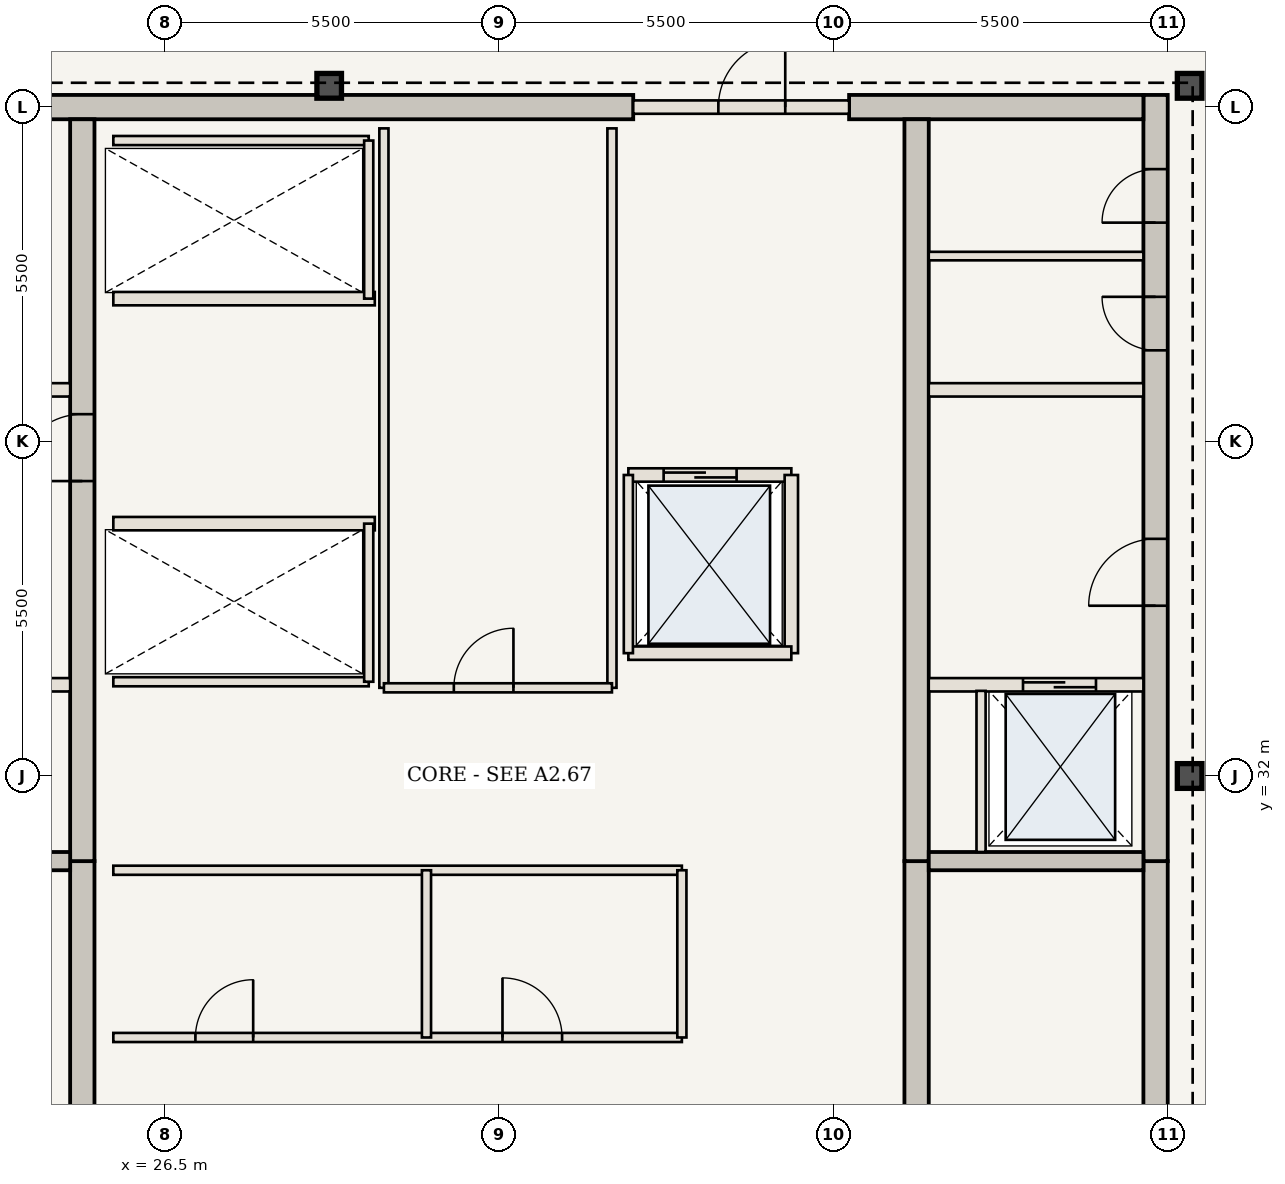
"""IFC4 building model, lengths in metres.
Left out: names, types, materials, properties, quantities, classifications, styles, units other than length and angle.
Written with IfcOpenShell. Run it as: python <this file> out.ifc"""

import sys

from ifc_helpers import new_model, si_unit, direction, frame, frame_2d, origin, origin_2d, place, context, subcontext, project, spatial, rectangle, i_section, extrude, element, fill, save


model = new_model("IFC4")
c1 = context("Model", 3, precision=1e-05, world=origin(), true_north=direction((0.0, 1.0)))
c2 = subcontext(c1, "Body", "Model", "MODEL_VIEW")
j1 = project(units=[si_unit("LENGTHUNIT", "METRE"), si_unit("PLANEANGLEUNIT", "RADIAN")], contexts=[c1])
p1 = place(None, origin())
s1 = spatial("IfcSite", under=j1, at=p1, CompositionType="ELEMENT")
p2 = place(p1, origin())
s2 = spatial("IfcBuilding", under=s1, at=p2, CompositionType="ELEMENT")
p3 = place(p2, frame((0.0, 0.0, 313.25)))
s3 = spatial("IfcBuildingStorey", under=s2, at=p3, CompositionType="ELEMENT", Elevation=313.25)
p4 = place(p3, frame((42.79, 20.75, 0.0), z_axis=(0.0, 0.0, 1.0), x_axis=(0.0, 1.0, 0.0)))
e1 = element("IfcWall", 1, at=p4, inside=s3, PredefinedType="SHEAR", context=c2, shape_type="SweptSolid", body=[
    extrude(rectangle(XDim=9.85, YDim=0.4, at=frame_2d((4.925, 0.0))), origin(), (0.0, 0.0, 1.0), 4.55),
])
p5 = place(p4, frame((1.0, 0.0, 0.0)))
e2 = element("IfcOpeningElement", 2, at=p5, cuts=e1, PredefinedType="OPENING", context=c2, shape_type="SweptSolid", body=[
    extrude(rectangle(XDim=1.15, YDim=2.15, at=frame_2d((0.575, 1.075))), frame((0.0, 0.21, 0.0), z_axis=(0.0, -1.0, 0.0), x_axis=(1.0, 0.0, 0.0)), (0.0, 0.0, 1.0), 0.42),
])
p6 = place(p3, frame((42.79, 30.6, 0.0), z_axis=(0.0, 0.0, 1.0), x_axis=(0.0, 1.0, 0.0)))
e3 = element("IfcWall", 3, at=p6, inside=s3, PredefinedType="SHEAR", context=c2, shape_type="SweptSolid", body=[
    extrude(rectangle(XDim=12.6, YDim=0.4, at=frame_2d((6.3, 0.0))), origin(), (0.0, 0.0, 1.0), 4.55),
])
p7 = place(p6, frame((4.2, 0.0, 0.0)))
e4 = element("IfcOpeningElement", 4, at=p7, cuts=e3, PredefinedType="OPENING", context=c2, shape_type="SweptSolid", body=[
    extrude(rectangle(XDim=1.1, YDim=2.15, at=frame_2d((0.55, 1.075))), frame((0.0, 0.21, 0.0), z_axis=(0.0, -1.0, 0.0), x_axis=(1.0, 0.0, 0.0)), (0.0, 0.0, 1.0), 0.42),
])
p8 = place(p6, frame((8.4, 0.0, 0.0)))
e5 = element("IfcOpeningElement", 5, at=p8, cuts=e3, PredefinedType="OPENING", context=c2, shape_type="SweptSolid", body=[
    extrude(rectangle(XDim=0.88, YDim=2.1, at=frame_2d((0.44, 1.05))), frame((0.0, 0.21, 0.0), z_axis=(0.0, -1.0, 0.0), x_axis=(1.0, 0.0, 0.0)), (0.0, 0.0, 1.0), 0.42),
])
p9 = place(p6, frame((10.5, 0.0, 0.0)))
e6 = element("IfcOpeningElement", 6, at=p9, cuts=e3, PredefinedType="OPENING", context=c2, shape_type="SweptSolid", body=[
    extrude(rectangle(XDim=0.88, YDim=2.1, at=frame_2d((0.44, 1.05))), frame((0.0, 0.21, 0.0), z_axis=(0.0, -1.0, 0.0), x_axis=(1.0, 0.0, 0.0)), (0.0, 0.0, 1.0), 0.42),
])
p10 = place(p3, frame((21.41, 43.0, 0.0), z_axis=(0.0, 0.0, 1.0), x_axis=(1.0, 0.0, 0.0)))
e7 = element("IfcWall", 7, at=p10, inside=s3, PredefinedType="SHEAR", context=c2, shape_type="SweptSolid", body=[
    extrude(rectangle(XDim=12.79, YDim=0.4, at=frame_2d((6.395, 0.0))), origin(), (0.0, 0.0, 1.0), 4.55),
])
p11 = place(p3, frame((37.75, 43.0, 0.0), z_axis=(0.0, 0.0, 1.0), x_axis=(1.0, 0.0, 0.0)))
e8 = element("IfcWall", 8, at=p11, inside=s3, PredefinedType="SHEAR", context=c2, shape_type="SweptSolid", body=[
    extrude(rectangle(XDim=4.84, YDim=0.4, at=frame_2d((2.42, 0.0))), origin(), (0.0, 0.0, 1.0), 4.55),
])
p12 = place(p3, frame((25.14, 21.15, 0.0), z_axis=(0.0, 0.0, 1.0), x_axis=(0.0, 1.0, 0.0)))
e9 = element("IfcWall", 9, at=p12, inside=s3, PredefinedType="SHEAR", context=c2, shape_type="SweptSolid", body=[
    extrude(rectangle(XDim=9.45, YDim=0.4, at=frame_2d((4.725, 0.0))), origin(), (0.0, 0.0, 1.0), 4.55),
])
p13 = place(p3, frame((25.14, 30.6, 0.0), z_axis=(0.0, 0.0, 1.0), x_axis=(0.0, 1.0, 0.0)))
e10 = element("IfcWall", 10, at=p13, inside=s3, PredefinedType="SHEAR", context=c2, shape_type="SweptSolid", body=[
    extrude(rectangle(XDim=12.2, YDim=0.4, at=frame_2d((6.1, 0.0))), origin(), (0.0, 0.0, 1.0), 4.55),
])
p14 = place(p13, frame((6.25, 0.0, 0.0)))
e11 = element("IfcOpeningElement", 11, at=p14, cuts=e10, PredefinedType="OPENING", context=c2, shape_type="SweptSolid", body=[
    extrude(rectangle(XDim=1.1, YDim=2.15, at=frame_2d((0.55, 1.075))), frame((0.0, 0.21, 0.0), z_axis=(0.0, -1.0, 0.0), x_axis=(1.0, 0.0, 0.0)), (0.0, 0.0, 1.0), 0.42),
])
p15 = place(p3, frame((38.86, 21.15, 0.0), z_axis=(0.0, 0.0, 1.0), x_axis=(0.0, 1.0, 0.0)))
e12 = element("IfcWall", 12, at=p15, inside=s3, PredefinedType="SHEAR", context=c2, shape_type="SweptSolid", body=[
    extrude(rectangle(XDim=9.45, YDim=0.4, at=frame_2d((4.725, 0.0))), origin(), (0.0, 0.0, 1.0), 4.55),
])
p16 = place(p3, frame((38.86, 30.6, 0.0), z_axis=(0.0, 0.0, 1.0), x_axis=(0.0, 1.0, 0.0)))
e13 = element("IfcWall", 13, at=p16, inside=s3, PredefinedType="SHEAR", context=c2, shape_type="SweptSolid", body=[
    extrude(rectangle(XDim=12.2, YDim=0.4, at=frame_2d((6.1, 0.0))), origin(), (0.0, 0.0, 1.0), 4.55),
])
for number, where, z_axis, x_axis in (
    (14, (43.35, 32.0, 0.0), (0.0, 0.0, 1.0), (1.0, 0.0, 0.0)),
    (15, (43.35, 43.35, 0.0), (0.0, 0.0, 1.0), (1.0, 0.0, 0.0)),
    (16, (29.2, 43.35, 0.0), (0.0, 0.0, 1.0), (1.0, 0.0, 0.0)),
):
    element("IfcColumn", number, at=place(p3, frame(where, z_axis=z_axis, x_axis=x_axis)), inside=s3, PredefinedType="COLUMN", context=c2, shape_type="SweptSolid", body=[
        extrude(i_section(OverallWidth=0.404, OverallDepth=0.407, WebThickness=0.027, FlangeThickness=0.044, at=origin_2d()), origin(), (0.0, 0.0, 1.0), 4.55),
    ])
for number, where, z_axis, x_axis in (
    (17, (21.41, 30.6, 0.0), (0.0, 0.0, 1.0), (1.0, 0.0, 0.0)),
    (18, (39.06, 30.6, 0.0), (0.0, 0.0, 1.0), (1.0, 0.0, 0.0)),
):
    element("IfcWall", number, at=place(p3, frame(where, z_axis=z_axis, x_axis=x_axis)), inside=s3, PredefinedType="SHEAR", context=c2, shape_type="SweptSolid", body=[
        extrude(rectangle(XDim=3.53, YDim=0.3, at=frame_2d((1.765, 0.0))), origin(), (0.0, 0.0, 1.0), 4.29),
    ])
p17 = place(p3, frame((21.41, 33.5, 0.0), z_axis=(0.0, 0.0, 1.0), x_axis=(1.0, 0.0, 0.0)))
e19 = element("IfcWall", 19, at=p17, inside=s3, PredefinedType="STANDARD", context=c2, shape_type="SweptSolid", body=[
    extrude(rectangle(XDim=3.53, YDim=0.22, at=frame_2d((1.765, 0.0))), origin(), (0.0, 0.0, 1.0), 4.29),
])
p18 = place(p17, frame((0.75, 0.0, 0.0)))
e20 = element("IfcOpeningElement", 20, at=p18, cuts=e19, PredefinedType="OPENING", context=c2, shape_type="SweptSolid", body=[
    extrude(rectangle(XDim=1.2, YDim=2.2, at=frame_2d((0.6, 1.1))), frame((0.0, 0.12, 0.0), z_axis=(0.0, -1.0, 0.0), x_axis=(1.0, 0.0, 0.0)), (0.0, 0.0, 1.0), 0.24),
])
p19 = place(p3, frame((39.06, 33.5, 0.0), z_axis=(0.0, 0.0, 1.0), x_axis=(1.0, 0.0, 0.0)))
e21 = element("IfcWall", 21, at=p19, inside=s3, PredefinedType="STANDARD", context=c2, shape_type="SweptSolid", body=[
    extrude(rectangle(XDim=3.53, YDim=0.22, at=frame_2d((1.765, 0.0))), origin(), (0.0, 0.0, 1.0), 4.29),
])
p20 = place(p19, frame((1.55, 0.0, 0.0)))
e22 = element("IfcOpeningElement", 22, at=p20, cuts=e21, PredefinedType="OPENING", context=c2, shape_type="SweptSolid", body=[
    extrude(rectangle(XDim=1.2, YDim=2.2, at=frame_2d((0.6, 1.1))), frame((0.0, 0.12, 0.0), z_axis=(0.0, -1.0, 0.0), x_axis=(1.0, 0.0, 0.0)), (0.0, 0.0, 1.0), 0.24),
])
p21 = place(p3, frame((39.92, 30.75, 0.0), z_axis=(0.0, 0.0, 1.0), x_axis=(0.0, 1.0, 0.0)))
e23 = element("IfcWall", 23, at=p21, inside=s3, PredefinedType="STANDARD", context=c2, shape_type="SweptSolid", body=[
    extrude(rectangle(XDim=2.65, YDim=0.15, at=frame_2d((1.325, 0.0))), origin(), (0.0, 0.0, 1.0), 4.29),
])
for number, where, z_axis, x_axis in (
    (24, (21.41, 38.35, 0.0), (0.0, 0.0, 1.0), (1.0, 0.0, 0.0)),
    (25, (39.06, 38.35, 0.0), (0.0, 0.0, 1.0), (1.0, 0.0, 0.0)),
):
    element("IfcWall", number, at=place(p3, frame(where, z_axis=z_axis, x_axis=x_axis)), inside=s3, PredefinedType="STANDARD", context=c2, shape_type="SweptSolid", body=[
        extrude(rectangle(XDim=3.53, YDim=0.22, at=frame_2d((1.765, 0.0))), origin(), (0.0, 0.0, 1.0), 4.29),
    ])
p22 = place(p3, frame((39.06, 40.55, 0.0), z_axis=(0.0, 0.0, 1.0), x_axis=(1.0, 0.0, 0.0)))
e26 = element("IfcWall", 26, at=p22, inside=s3, PredefinedType="STANDARD", context=c2, shape_type="SweptSolid", body=[
    extrude(rectangle(XDim=3.53, YDim=0.14, at=frame_2d((1.765, 0.0))), origin(), (0.0, 0.0, 1.0), 4.29),
])
p23 = place(p3, frame((25.65, 27.7, 0.0), z_axis=(0.0, 0.0, 1.0), x_axis=(1.0, 0.0, 0.0)))
e27 = element("IfcWall", 27, at=p23, inside=s3, PredefinedType="STANDARD", context=c2, shape_type="SweptSolid", body=[
    extrude(rectangle(XDim=9.35, YDim=0.15, at=frame_2d((4.675, 0.0))), origin(), (0.0, 0.0, 1.0), 4.29),
])
p24 = place(p23, frame((1.35, 0.0, 0.0)))
e28 = element("IfcOpeningElement", 28, at=p24, cuts=e27, PredefinedType="OPENING", context=c2, shape_type="SweptSolid", body=[
    extrude(rectangle(XDim=0.95, YDim=2.15, at=frame_2d((0.475, 1.075))), frame((0.0, 0.085, 0.0), z_axis=(0.0, -1.0, 0.0), x_axis=(1.0, 0.0, 0.0)), (0.0, 0.0, 1.0), 0.17),
])
p25 = place(p23, frame((6.4, 0.0, 0.0)))
e29 = element("IfcOpeningElement", 29, at=p25, cuts=e27, PredefinedType="OPENING", context=c2, shape_type="SweptSolid", body=[
    extrude(rectangle(XDim=0.98, YDim=2.2, at=frame_2d((0.49, 1.1))), frame((0.0, 0.085, 0.0), z_axis=(0.0, -1.0, 0.0), x_axis=(1.0, 0.0, 0.0)), (0.0, 0.0, 1.0), 0.17),
])
p26 = place(p3, frame((25.65, 30.45, 0.0), z_axis=(0.0, 0.0, 1.0), x_axis=(1.0, 0.0, 0.0)))
e30 = element("IfcWall", 30, at=p26, inside=s3, PredefinedType="STANDARD", context=c2, shape_type="SweptSolid", body=[
    extrude(rectangle(XDim=9.35, YDim=0.15, at=frame_2d((4.675, 0.0))), origin(), (0.0, 0.0, 1.0), 4.29),
])
for number, where, z_axis, x_axis in (
    (31, (30.8, 27.7, 0.0), (0.0, 0.0, 1.0), (0.0, 1.0, 0.0)),
    (32, (35.0, 27.7, 0.0), (0.0, 0.0, 1.0), (0.0, 1.0, 0.0)),
):
    element("IfcWall", number, at=place(p3, frame(where, z_axis=z_axis, x_axis=x_axis)), inside=s3, PredefinedType="STANDARD", context=c2, shape_type="SweptSolid", body=[
        extrude(rectangle(XDim=2.75, YDim=0.15, at=frame_2d((1.375, 0.0))), origin(), (0.0, 0.0, 1.0), 4.29),
    ])
p27 = place(p3, frame((25.65, 36.15, 0.0), z_axis=(0.0, 0.0, 1.0), x_axis=(1.0, 0.0, 0.0)))
e33 = element("IfcWall", 33, at=p27, inside=s3, PredefinedType="STANDARD", context=c2, shape_type="SweptSolid", body=[
    extrude(rectangle(XDim=4.3, YDim=0.22, at=frame_2d((2.15, 0.0))), origin(), (0.0, 0.0, 1.0), 4.29),
])
p28 = place(p3, frame((25.65, 33.55, 0.0), z_axis=(0.0, 0.0, 1.0), x_axis=(1.0, 0.0, 0.0)))
e34 = element("IfcWall", 34, at=p28, inside=s3, PredefinedType="STANDARD", context=c2, shape_type="SweptSolid", body=[
    extrude(rectangle(XDim=4.2, YDim=0.15, at=frame_2d((2.1, 0.0))), origin(), (0.0, 0.0, 1.0), 4.29),
])
p29 = place(p3, frame((29.85, 33.55, 0.0), z_axis=(0.0, 0.0, 1.0), x_axis=(0.0, 1.0, 0.0)))
e35 = element("IfcWall", 35, at=p29, inside=s3, PredefinedType="STANDARD", context=c2, shape_type="SweptSolid", body=[
    extrude(rectangle(XDim=2.6, YDim=0.15, at=frame_2d((1.3, 0.0))), origin(), (0.0, 0.0, 1.0), 4.29),
])
p30 = place(p3, frame((25.65, 39.85, 0.0), z_axis=(0.0, 0.0, 1.0), x_axis=(1.0, 0.0, 0.0)))
e36 = element("IfcWall", 36, at=p30, inside=s3, PredefinedType="STANDARD", context=c2, shape_type="SweptSolid", body=[
    extrude(rectangle(XDim=4.3, YDim=0.22, at=frame_2d((2.15, 0.0))), origin(), (0.0, 0.0, 1.0), 4.29),
])
p31 = place(p3, frame((25.65, 42.45, 0.0), z_axis=(0.0, 0.0, 1.0), x_axis=(1.0, 0.0, 0.0)))
e37 = element("IfcWall", 37, at=p31, inside=s3, PredefinedType="STANDARD", context=c2, shape_type="SweptSolid", body=[
    extrude(rectangle(XDim=4.2, YDim=0.15, at=frame_2d((2.1, 0.0))), origin(), (0.0, 0.0, 1.0), 4.29),
])
p32 = place(p3, frame((29.85, 39.85, 0.0), z_axis=(0.0, 0.0, 1.0), x_axis=(0.0, 1.0, 0.0)))
e38 = element("IfcWall", 38, at=p32, inside=s3, PredefinedType="STANDARD", context=c2, shape_type="SweptSolid", body=[
    extrude(rectangle(XDim=2.6, YDim=0.15, at=frame_2d((1.3, 0.0))), origin(), (0.0, 0.0, 1.0), 4.29),
])
for number, where, z_axis, x_axis in (
    (39, (30.1, 33.45, 0.0), (0.0, 0.0, 1.0), (0.0, 1.0, 0.0)),
    (40, (33.85, 33.45, 0.0), (0.0, 0.0, 1.0), (0.0, 1.0, 0.0)),
):
    element("IfcWall", number, at=place(p3, frame(where, z_axis=z_axis, x_axis=x_axis)), inside=s3, PredefinedType="STANDARD", context=c2, shape_type="SweptSolid", body=[
        extrude(rectangle(XDim=9.2, YDim=0.15, at=frame_2d((4.6, 0.0))), origin(), (0.0, 0.0, 1.0), 4.29),
    ])
p33 = place(p3, frame((30.1, 33.45, 0.0), z_axis=(0.0, 0.0, 1.0), x_axis=(1.0, 0.0, 0.0)))
e41 = element("IfcWall", 41, at=p33, inside=s3, PredefinedType="STANDARD", context=c2, shape_type="SweptSolid", body=[
    extrude(rectangle(XDim=3.75, YDim=0.15, at=frame_2d((1.875, 0.0))), origin(), (0.0, 0.0, 1.0), 4.29),
])
p34 = place(p33, frame((1.15, 0.0, 0.0)))
e42 = element("IfcOpeningElement", 42, at=p34, cuts=e41, PredefinedType="OPENING", context=c2, shape_type="SweptSolid", body=[
    extrude(rectangle(XDim=0.98, YDim=2.2, at=frame_2d((0.49, 1.1))), frame((0.0, 0.085, 0.0), z_axis=(0.0, -1.0, 0.0), x_axis=(1.0, 0.0, 0.0)), (0.0, 0.0, 1.0), 0.17),
])
p35 = place(p3, frame((34.2, 43.0, 0.0), z_axis=(0.0, 0.0, 1.0), x_axis=(1.0, 0.0, 0.0)))
e43 = element("IfcWall", 43, at=p35, inside=s3, PredefinedType="STANDARD", context=c2, shape_type="SweptSolid", body=[
    extrude(rectangle(XDim=3.55, YDim=0.22, at=frame_2d((1.775, 0.0))), origin(), (0.0, 0.0, 1.0), 4.29),
])
p36 = place(p35, frame((1.4, 0.0, 0.0)))
e44 = element("IfcOpeningElement", 44, at=p36, cuts=e43, PredefinedType="OPENING", context=c2, shape_type="SweptSolid", body=[
    extrude(rectangle(XDim=1.1, YDim=2.15, at=frame_2d((0.55, 1.075))), frame((0.0, 0.12, 0.0), z_axis=(0.0, -1.0, 0.0), x_axis=(1.0, 0.0, 0.0)), (0.0, 0.0, 1.0), 0.24),
])
p37 = place(p3, frame((34.12, 36.95, 0.0), z_axis=(0.0, 0.0, 1.0), x_axis=(1.0, 0.0, 0.0)))
e45 = element("IfcWall", 45, at=p37, inside=s3, PredefinedType="STANDARD", context=c2, shape_type="SweptSolid", body=[
    extrude(rectangle(XDim=2.68, YDim=0.22, at=frame_2d((1.34, 0.0))), origin(), (0.0, 0.0, 1.0), 4.29),
])
p38 = place(p37, frame((0.58, 0.0, 0.0)))
e46 = element("IfcOpeningElement", 46, at=p38, cuts=e45, PredefinedType="OPENING", context=c2, shape_type="SweptSolid", body=[
    extrude(rectangle(XDim=1.2, YDim=2.2, at=frame_2d((0.6, 1.1))), frame((0.0, 0.12, 0.0), z_axis=(0.0, -1.0, 0.0), x_axis=(1.0, 0.0, 0.0)), (0.0, 0.0, 1.0), 0.24),
])
p39 = place(p3, frame((36.8, 34.02, 0.0), z_axis=(0.0, 0.0, 1.0), x_axis=(0.0, 1.0, 0.0)))
e47 = element("IfcWall", 47, at=p39, inside=s3, PredefinedType="STANDARD", context=c2, shape_type="SweptSolid", body=[
    extrude(rectangle(XDim=2.93, YDim=0.22, at=frame_2d((1.465, 0.0))), origin(), (0.0, 0.0, 1.0), 4.29),
])
p40 = place(p3, frame((34.12, 34.02, 0.0), z_axis=(0.0, 0.0, 1.0), x_axis=(1.0, 0.0, 0.0)))
e48 = element("IfcWall", 48, at=p40, inside=s3, PredefinedType="STANDARD", context=c2, shape_type="SweptSolid", body=[
    extrude(rectangle(XDim=2.68, YDim=0.22, at=frame_2d((1.34, 0.0))), origin(), (0.0, 0.0, 1.0), 4.29),
])
p41 = place(p3, frame((34.12, 34.02, 0.0), z_axis=(0.0, 0.0, 1.0), x_axis=(0.0, 1.0, 0.0)))
e49 = element("IfcWall", 49, at=p41, inside=s3, PredefinedType="STANDARD", context=c2, shape_type="SweptSolid", body=[
    extrude(rectangle(XDim=2.93, YDim=0.15, at=frame_2d((1.465, 0.0))), origin(), (0.0, 0.0, 1.0), 4.29),
])
p42 = place(p7, origin())
e50 = element("IfcDoor", 50, at=p42, inside=s3, OperationType="SINGLE_SWING_LEFT", PredefinedType="DOOR", context=c2, shape_type="SweptSolid", body=[
    extrude(rectangle(XDim=1.1, YDim=2.15, at=frame_2d((0.55, 1.075))), frame((0.0, 0.025, 0.0), z_axis=(0.0, -1.0, 0.0), x_axis=(1.0, 0.0, 0.0)), (0.0, 0.0, 1.0), 0.05),
])
fill(e4, e50)
p43 = place(p14, origin())
e51 = element("IfcDoor", 51, at=p43, inside=s3, OperationType="SINGLE_SWING_LEFT", PredefinedType="DOOR", context=c2, shape_type="SweptSolid", body=[
    extrude(rectangle(XDim=1.1, YDim=2.15, at=frame_2d((0.55, 1.075))), frame((0.0, 0.025, 0.0), z_axis=(0.0, -1.0, 0.0), x_axis=(1.0, 0.0, 0.0)), (0.0, 0.0, 1.0), 0.05),
])
fill(e11, e51)
p44 = place(p8, origin())
e52 = element("IfcDoor", 52, at=p44, inside=s3, OperationType="SINGLE_SWING_RIGHT", PredefinedType="DOOR", context=c2, shape_type="SweptSolid", body=[
    extrude(rectangle(XDim=0.88, YDim=2.1, at=frame_2d((0.44, 1.05))), frame((0.0, 0.025, 0.0), z_axis=(0.0, -1.0, 0.0), x_axis=(1.0, 0.0, 0.0)), (0.0, 0.0, 1.0), 0.05),
])
fill(e5, e52)
p45 = place(p9, origin())
e53 = element("IfcDoor", 53, at=p45, inside=s3, OperationType="SINGLE_SWING_LEFT", PredefinedType="DOOR", context=c2, shape_type="SweptSolid", body=[
    extrude(rectangle(XDim=0.88, YDim=2.1, at=frame_2d((0.44, 1.05))), frame((0.0, 0.025, 0.0), z_axis=(0.0, -1.0, 0.0), x_axis=(1.0, 0.0, 0.0)), (0.0, 0.0, 1.0), 0.05),
])
fill(e6, e53)
p46 = place(p20, origin())
e54 = element("IfcDoor", 54, at=p46, inside=s3, OperationType="DOUBLE_DOOR_SLIDING", PredefinedType="DOOR", context=c2, shape_type="SweptSolid", body=[
    extrude(rectangle(XDim=1.2, YDim=2.2, at=frame_2d((0.6, 1.1))), frame((0.0, 0.025, 0.0), z_axis=(0.0, -1.0, 0.0), x_axis=(1.0, 0.0, 0.0)), (0.0, 0.0, 1.0), 0.05),
])
fill(e22, e54)
p47 = place(p24, origin())
e55 = element("IfcDoor", 55, at=p47, inside=s3, OperationType="SINGLE_SWING_RIGHT", PredefinedType="DOOR", context=c2, shape_type="SweptSolid", body=[
    extrude(rectangle(XDim=0.95, YDim=2.15, at=frame_2d((0.475, 1.075))), frame((0.0, 0.025, 0.0), z_axis=(0.0, -1.0, 0.0), x_axis=(1.0, 0.0, 0.0)), (0.0, 0.0, 1.0), 0.05),
])
fill(e28, e55)
p48 = place(p25, origin())
e56 = element("IfcDoor", 56, at=p48, inside=s3, OperationType="SINGLE_SWING_LEFT", PredefinedType="DOOR", context=c2, shape_type="SweptSolid", body=[
    extrude(rectangle(XDim=0.98, YDim=2.2, at=frame_2d((0.49, 1.1))), frame((0.0, 0.025, 0.0), z_axis=(0.0, -1.0, 0.0), x_axis=(1.0, 0.0, 0.0)), (0.0, 0.0, 1.0), 0.05),
])
fill(e29, e56)
p49 = place(p34, origin())
e57 = element("IfcDoor", 57, at=p49, inside=s3, OperationType="SINGLE_SWING_RIGHT", PredefinedType="DOOR", context=c2, shape_type="SweptSolid", body=[
    extrude(rectangle(XDim=0.98, YDim=2.2, at=frame_2d((0.49, 1.1))), frame((0.0, 0.025, 0.0), z_axis=(0.0, -1.0, 0.0), x_axis=(1.0, 0.0, 0.0)), (0.0, 0.0, 1.0), 0.05),
])
fill(e42, e57)
p50 = place(p36, origin())
e58 = element("IfcDoor", 58, at=p50, inside=s3, OperationType="SINGLE_SWING_RIGHT", PredefinedType="DOOR", context=c2, shape_type="SweptSolid", body=[
    extrude(rectangle(XDim=1.1, YDim=2.15, at=frame_2d((0.55, 1.075))), frame((0.0, 0.025, 0.0), z_axis=(0.0, -1.0, 0.0), x_axis=(1.0, 0.0, 0.0)), (0.0, 0.0, 1.0), 0.05),
])
fill(e44, e58)
p51 = place(p38, origin())
e59 = element("IfcDoor", 59, at=p51, inside=s3, OperationType="DOUBLE_DOOR_SLIDING", PredefinedType="DOOR", context=c2, shape_type="SweptSolid", body=[
    extrude(rectangle(XDim=1.2, YDim=2.2, at=frame_2d((0.6, 1.1))), frame((0.0, 0.025, 0.0), z_axis=(0.0, -1.0, 0.0), x_axis=(1.0, 0.0, 0.0)), (0.0, 0.0, 1.0), 0.05),
])
fill(e46, e59)
save(model, sys.argv[1])
